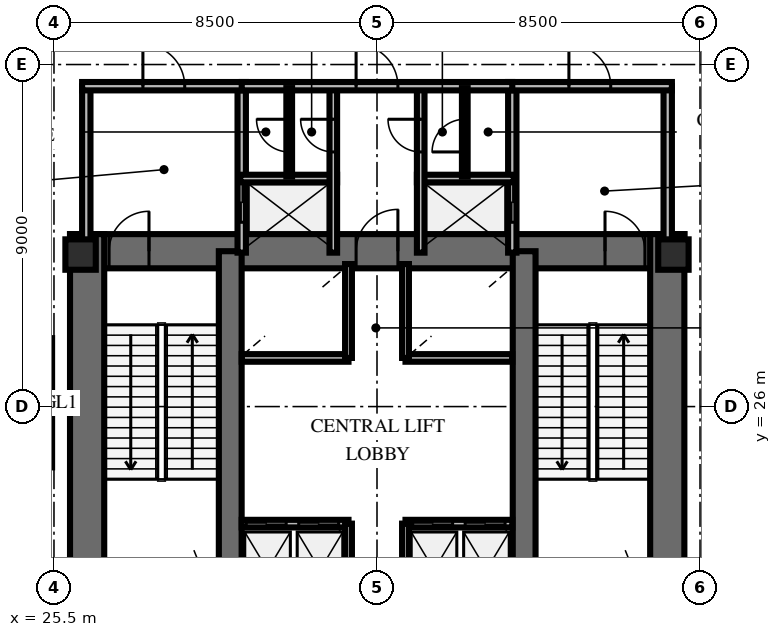
"""IFC4 building model, lengths in metres.
Left out: names, types, materials, properties, quantities, classifications, styles, units other than length and angle.
Written with IfcOpenShell. Run it as: python <this file> out.ifc"""

import sys

from ifc_helpers import new_model, si_unit, direction, frame, frame_2d, origin, origin_2d, place, context, subcontext, project, spatial, rectangle, extrude, element, fill, save


model = new_model("IFC4")
c1 = context("Model", 3, precision=1e-05, world=origin(), true_north=direction((0.0, 1.0)))
c2 = subcontext(c1, "Body", "Model", "MODEL_VIEW")
j1 = project(units=[si_unit("LENGTHUNIT", "METRE"), si_unit("PLANEANGLEUNIT", "RADIAN")], contexts=[c1])
p1 = place(None, origin())
s1 = spatial("IfcSite", under=j1, at=p1, CompositionType="ELEMENT")
p2 = place(p1, origin())
s2 = spatial("IfcBuilding", under=s1, at=p2, CompositionType="ELEMENT")
p3 = place(p2, frame((0.0, 0.0, 10.2)))
s3 = spatial("IfcBuildingStorey", under=s2, at=p3, CompositionType="ELEMENT", Elevation=10.2)
p4 = place(p3, frame((25.922, 30.088, 0.0), z_axis=(0.0, 0.0, 1.0), x_axis=(1.0, 0.0, 0.0)))
e1 = element("IfcWall", 1, at=p4, inside=s3, PredefinedType="SHEAR", context=c2, shape_type="SweptSolid", body=[
    extrude(rectangle(XDim=16.166, YDim=0.9, at=frame_2d((8.083, 0.0))), origin(), (0.0, 0.0, 1.0), 5.4),
])
p5 = place(p4, frame((1.028, 0.0, 0.0)))
e2 = element("IfcOpeningElement", 2, at=p5, cuts=e1, PredefinedType="OPENING", context=c2, shape_type="SweptSolid", body=[
    extrude(rectangle(XDim=1.05, YDim=2.15, at=frame_2d((0.525, 1.075))), frame((0.0, 0.46, 0.0), z_axis=(0.0, -1.0, 0.0), x_axis=(1.0, 0.0, 0.0)), (0.0, 0.0, 1.0), 0.92),
])
p6 = place(p4, frame((14.078, 0.0, 0.0)))
e3 = element("IfcOpeningElement", 3, at=p6, cuts=e1, PredefinedType="OPENING", context=c2, shape_type="SweptSolid", body=[
    extrude(rectangle(XDim=1.05, YDim=2.15, at=frame_2d((0.525, 1.075))), frame((0.0, 0.46, 0.0), z_axis=(0.0, -1.0, 0.0), x_axis=(1.0, 0.0, 0.0)), (0.0, 0.0, 1.0), 0.92),
])
p7 = place(p4, frame((7.528, 0.0, 0.0)))
e4 = element("IfcOpeningElement", 4, at=p7, cuts=e1, PredefinedType="OPENING", context=c2, shape_type="SweptSolid", body=[
    extrude(rectangle(XDim=1.1, YDim=2.15, at=frame_2d((0.55, 1.075))), frame((0.0, 0.46, 0.0), z_axis=(0.0, -1.0, 0.0), x_axis=(1.0, 0.0, 0.0)), (0.0, 0.0, 1.0), 0.92),
])
for number, where, z_axis, x_axis in (
    (5, (26.372, 19.662, 0.0), (0.0, 0.0, 1.0), (0.0, 1.0, 0.0)),
    (6, (41.638, 19.662, 0.0), (0.0, 0.0, 1.0), (0.0, 1.0, 0.0)),
):
    element("IfcWall", number, at=place(p3, frame(where, z_axis=z_axis, x_axis=x_axis)), inside=s3, PredefinedType="SHEAR", context=c2, shape_type="SweptSolid", body=[
        extrude(rectangle(XDim=10.876, YDim=0.9, at=frame_2d((5.438, 0.0))), origin(), (0.0, 0.0, 1.0), 5.4),
    ])
for number, where, z_axis, x_axis in (
    (7, (30.138, 20.112, 0.0), (0.0, 0.0, 1.0), (0.0, 1.0, 0.0)),
    (8, (37.872, 20.112, 0.0), (0.0, 0.0, 1.0), (0.0, 1.0, 0.0)),
):
    element("IfcWall", number, at=place(p3, frame(where, z_axis=z_axis, x_axis=x_axis)), inside=s3, PredefinedType="SHEAR", context=c2, shape_type="SweptSolid", body=[
        extrude(rectangle(XDim=9.976, YDim=0.6, at=frame_2d((4.988, 0.0))), origin(), (0.0, 0.0, 1.0), 5.4),
    ])
for number, where, z_axis, x_axis in (
    (9, (26.2, 30.0, 0.0), (0.0, 0.0, 1.0), (1.0, 0.0, 0.0)),
    (10, (41.8, 30.0, 0.0), (0.0, 0.0, 1.0), (1.0, 0.0, 0.0)),
):
    element("IfcColumn", number, at=place(p3, frame(where, z_axis=z_axis, x_axis=x_axis)), inside=s3, PredefinedType="PILASTER", context=c2, shape_type="SweptSolid", body=[
        extrude(rectangle(XDim=0.8, YDim=0.8, at=origin_2d()), origin(), (0.0, 0.0, 1.0), 5.4),
    ])
p8 = place(p3, frame((26.35, 30.05, 0.0), z_axis=(0.0, 0.0, 1.0), x_axis=(0.0, 1.0, 0.0)))
e11 = element("IfcWall", 11, at=p8, inside=s3, PredefinedType="SOLIDWALL", context=c2, shape_type="SweptSolid", body=[
    extrude(rectangle(XDim=4.38, YDim=0.22, at=frame_2d((2.19, 0.0))), origin(), (0.0, 0.0, 1.0), 3.21),
])
p9 = place(p3, frame((30.44, 30.05, 0.0), z_axis=(0.0, 0.0, 1.0), x_axis=(0.0, 1.0, 0.0)))
e12 = element("IfcWall", 12, at=p9, inside=s3, PredefinedType="SOLIDWALL", context=c2, shape_type="SweptSolid", body=[
    extrude(rectangle(XDim=4.38, YDim=0.22, at=frame_2d((2.19, 0.0))), origin(), (0.0, 0.0, 1.0), 3.21),
])
p10 = place(p9, frame((0.8, 0.0, 0.0)))
e13 = element("IfcOpeningElement", 13, at=p10, cuts=e12, PredefinedType="OPENING", context=c2, shape_type="SweptSolid", body=[
    extrude(rectangle(XDim=1.05, YDim=2.1, at=frame_2d((0.525, 1.05))), frame((0.0, 0.12, 0.0), z_axis=(0.0, -1.0, 0.0), x_axis=(1.0, 0.0, 0.0)), (0.0, 0.0, 1.0), 0.24),
])
p11 = place(p3, frame((26.24, 34.43, 0.0), z_axis=(0.0, 0.0, 1.0), x_axis=(1.0, 0.0, 0.0)))
e14 = element("IfcWall", 14, at=p11, inside=s3, PredefinedType="SOLIDWALL", context=c2, shape_type="SweptSolid", body=[
    extrude(rectangle(XDim=4.31, YDim=0.22, at=frame_2d((2.155, 0.0))), origin(), (0.0, 0.0, 1.0), 3.21),
])
p12 = place(p11, frame((1.6, 0.0, 0.0)))
e15 = element("IfcOpeningElement", 15, at=p12, cuts=e14, PredefinedType="OPENING", context=c2, shape_type="SweptSolid", body=[
    extrude(rectangle(XDim=1.1, YDim=2.15, at=frame_2d((0.55, 1.075))), frame((0.0, 0.12, 0.0), z_axis=(0.0, -1.0, 0.0), x_axis=(1.0, 0.0, 0.0)), (0.0, 0.0, 1.0), 0.24),
])
p13 = place(p3, frame((30.4, 32.0, 0.0), z_axis=(0.0, 0.0, 1.0), x_axis=(1.0, 0.0, 0.0)))
e16 = element("IfcWall", 16, at=p13, inside=s3, PredefinedType="SOLIDWALL", context=c2, shape_type="SweptSolid", body=[
    extrude(rectangle(XDim=2.55, YDim=0.2, at=frame_2d((1.275, 0.0))), origin(), (0.0, 0.0, 1.0), 3.21),
])
p14 = place(p3, frame((32.85, 30.05, 0.0), z_axis=(0.0, 0.0, 1.0), x_axis=(0.0, 1.0, 0.0)))
e17 = element("IfcWall", 17, at=p14, inside=s3, PredefinedType="SOLIDWALL", context=c2, shape_type="SweptSolid", body=[
    extrude(rectangle(XDim=4.38, YDim=0.2, at=frame_2d((2.19, 0.0))), origin(), (0.0, 0.0, 1.0), 3.21),
])
p15 = place(p14, frame((2.65, 0.0, 0.0)))
e18 = element("IfcOpeningElement", 18, at=p15, cuts=e17, PredefinedType="OPENING", context=c2, shape_type="SweptSolid", body=[
    extrude(rectangle(XDim=0.86, YDim=2.05, at=frame_2d((0.43, 1.025))), frame((0.0, 0.11, 0.0), z_axis=(0.0, -1.0, 0.0), x_axis=(1.0, 0.0, 0.0)), (0.0, 0.0, 1.0), 0.22),
])
p16 = place(p3, frame((37.56, 30.05, 0.0), z_axis=(0.0, 0.0, 1.0), x_axis=(0.0, 1.0, 0.0)))
e19 = element("IfcWall", 19, at=p16, inside=s3, PredefinedType="SOLIDWALL", context=c2, shape_type="SweptSolid", body=[
    extrude(rectangle(XDim=4.38, YDim=0.22, at=frame_2d((2.19, 0.0))), origin(), (0.0, 0.0, 1.0), 3.21),
])
p17 = place(p16, frame((0.8, 0.0, 0.0)))
e20 = element("IfcOpeningElement", 20, at=p17, cuts=e19, PredefinedType="OPENING", context=c2, shape_type="SweptSolid", body=[
    extrude(rectangle(XDim=1.05, YDim=2.1, at=frame_2d((0.525, 1.05))), frame((0.0, 0.12, 0.0), z_axis=(0.0, -1.0, 0.0), x_axis=(1.0, 0.0, 0.0)), (0.0, 0.0, 1.0), 0.24),
])
p18 = place(p3, frame((41.65, 30.05, 0.0), z_axis=(0.0, 0.0, 1.0), x_axis=(0.0, 1.0, 0.0)))
e21 = element("IfcWall", 21, at=p18, inside=s3, PredefinedType="SOLIDWALL", context=c2, shape_type="SweptSolid", body=[
    extrude(rectangle(XDim=4.38, YDim=0.22, at=frame_2d((2.19, 0.0))), origin(), (0.0, 0.0, 1.0), 3.21),
])
p19 = place(p3, frame((37.45, 34.43, 0.0), z_axis=(0.0, 0.0, 1.0), x_axis=(1.0, 0.0, 0.0)))
e22 = element("IfcWall", 22, at=p19, inside=s3, PredefinedType="SOLIDWALL", context=c2, shape_type="SweptSolid", body=[
    extrude(rectangle(XDim=4.31, YDim=0.22, at=frame_2d((2.155, 0.0))), origin(), (0.0, 0.0, 1.0), 3.21),
])
p20 = place(p19, frame((1.6, 0.0, 0.0)))
e23 = element("IfcOpeningElement", 23, at=p20, cuts=e22, PredefinedType="OPENING", context=c2, shape_type="SweptSolid", body=[
    extrude(rectangle(XDim=1.1, YDim=2.15, at=frame_2d((0.55, 1.075))), frame((0.0, 0.12, 0.0), z_axis=(0.0, -1.0, 0.0), x_axis=(1.0, 0.0, 0.0)), (0.0, 0.0, 1.0), 0.24),
])
p21 = place(p3, frame((35.05, 32.0, 0.0), z_axis=(0.0, 0.0, 1.0), x_axis=(1.0, 0.0, 0.0)))
e24 = element("IfcWall", 24, at=p21, inside=s3, PredefinedType="SOLIDWALL", context=c2, shape_type="SweptSolid", body=[
    extrude(rectangle(XDim=2.55, YDim=0.2, at=frame_2d((1.275, 0.0))), origin(), (0.0, 0.0, 1.0), 3.21),
])
p22 = place(p3, frame((35.15, 30.05, 0.0), z_axis=(0.0, 0.0, 1.0), x_axis=(0.0, 1.0, 0.0)))
e25 = element("IfcWall", 25, at=p22, inside=s3, PredefinedType="SOLIDWALL", context=c2, shape_type="SweptSolid", body=[
    extrude(rectangle(XDim=4.38, YDim=0.2, at=frame_2d((2.19, 0.0))), origin(), (0.0, 0.0, 1.0), 3.21),
])
p23 = place(p22, frame((2.65, 0.0, 0.0)))
e26 = element("IfcOpeningElement", 26, at=p23, cuts=e25, PredefinedType="OPENING", context=c2, shape_type="SweptSolid", body=[
    extrude(rectangle(XDim=0.86, YDim=2.05, at=frame_2d((0.43, 1.025))), frame((0.0, 0.11, 0.0), z_axis=(0.0, -1.0, 0.0), x_axis=(1.0, 0.0, 0.0)), (0.0, 0.0, 1.0), 0.22),
])
p24 = place(p3, frame((30.44, 34.43, 0.0), z_axis=(0.0, 0.0, 1.0), x_axis=(1.0, 0.0, 0.0)))
e27 = element("IfcWall", 27, at=p24, inside=s3, PredefinedType="SOLIDWALL", context=c2, shape_type="SweptSolid", body=[
    extrude(rectangle(XDim=7.12, YDim=0.22, at=frame_2d((3.56, 0.0))), origin(), (0.0, 0.0, 1.0), 3.21),
])
p25 = place(p24, frame((3.01, 0.0, 0.0)))
e28 = element("IfcOpeningElement", 28, at=p25, cuts=e27, PredefinedType="OPENING", context=c2, shape_type="SweptSolid", body=[
    extrude(rectangle(XDim=1.1, YDim=2.15, at=frame_2d((0.55, 1.075))), frame((0.0, 0.12, 0.0), z_axis=(0.0, -1.0, 0.0), x_axis=(1.0, 0.0, 0.0)), (0.0, 0.0, 1.0), 0.24),
])
p26 = place(p3, frame((31.69, 32.05, 0.0), z_axis=(0.0, 0.0, 1.0), x_axis=(0.0, 1.0, 0.0)))
e29 = element("IfcWall", 29, at=p26, inside=s3, PredefinedType="PARTITIONING", context=c2, shape_type="SweptSolid", body=[
    extrude(rectangle(XDim=2.33, YDim=0.15, at=frame_2d((1.165, 0.0))), origin(), (0.0, 0.0, 1.0), 3.21),
])
p27 = place(p26, frame((0.65, 0.0, 0.0)))
e30 = element("IfcOpeningElement", 30, at=p27, cuts=e29, PredefinedType="OPENING", context=c2, shape_type="SweptSolid", body=[
    extrude(rectangle(XDim=0.86, YDim=2.05, at=frame_2d((0.43, 1.025))), frame((0.0, 0.085, 0.0), z_axis=(0.0, -1.0, 0.0), x_axis=(1.0, 0.0, 0.0)), (0.0, 0.0, 1.0), 0.17),
])
p28 = place(p3, frame((36.31, 32.05, 0.0), z_axis=(0.0, 0.0, 1.0), x_axis=(0.0, 1.0, 0.0)))
e31 = element("IfcWall", 31, at=p28, inside=s3, PredefinedType="PARTITIONING", context=c2, shape_type="SweptSolid", body=[
    extrude(rectangle(XDim=2.33, YDim=0.15, at=frame_2d((1.165, 0.0))), origin(), (0.0, 0.0, 1.0), 3.21),
])
p29 = place(p28, frame((0.65, 0.0, 0.0)))
e32 = element("IfcOpeningElement", 32, at=p29, cuts=e31, PredefinedType="OPENING", context=c2, shape_type="SweptSolid", body=[
    extrude(rectangle(XDim=0.86, YDim=2.05, at=frame_2d((0.43, 1.025))), frame((0.0, 0.085, 0.0), z_axis=(0.0, -1.0, 0.0), x_axis=(1.0, 0.0, 0.0)), (0.0, 0.0, 1.0), 0.17),
])
p30 = place(p3, frame((30.44, 22.92, 0.0), z_axis=(0.0, 0.0, 1.0), x_axis=(1.0, 0.0, 0.0)))
e33 = element("IfcWall", 33, at=p30, inside=s3, PredefinedType="SOLIDWALL", context=c2, shape_type="SweptSolid", body=[
    extrude(rectangle(XDim=2.81, YDim=0.2, at=frame_2d((1.405, 0.0))), origin(), (0.0, 0.0, 1.0), 3.21),
])
p31 = place(p30, frame((0.12, 0.0, 0.0)))
e34 = element("IfcOpeningElement", 34, at=p31, cuts=e33, PredefinedType="OPENING", context=c2, shape_type="SweptSolid", body=[
    extrude(rectangle(XDim=1.05, YDim=2.1, at=frame_2d((0.525, 1.05))), frame((0.0, 0.11, 0.0), z_axis=(0.0, -1.0, 0.0), x_axis=(1.0, 0.0, 0.0)), (0.0, 0.0, 1.0), 0.22),
])
p32 = place(p30, frame((1.5, 0.0, 0.0)))
e35 = element("IfcOpeningElement", 35, at=p32, cuts=e33, PredefinedType="OPENING", context=c2, shape_type="SweptSolid", body=[
    extrude(rectangle(XDim=1.05, YDim=2.1, at=frame_2d((0.525, 1.05))), frame((0.0, 0.11, 0.0), z_axis=(0.0, -1.0, 0.0), x_axis=(1.0, 0.0, 0.0)), (0.0, 0.0, 1.0), 0.22),
])
p33 = place(p3, frame((33.25, 20.5, 0.0), z_axis=(0.0, 0.0, 1.0), x_axis=(0.0, 1.0, 0.0)))
e36 = element("IfcWall", 36, at=p33, inside=s3, PredefinedType="SOLIDWALL", context=c2, shape_type="SweptSolid", body=[
    extrude(rectangle(XDim=2.42, YDim=0.18, at=frame_2d((1.21, 0.0))), origin(), (0.0, 0.0, 1.0), 3.21),
])
p34 = place(p3, frame((34.75, 22.92, 0.0), z_axis=(0.0, 0.0, 1.0), x_axis=(1.0, 0.0, 0.0)))
e37 = element("IfcWall", 37, at=p34, inside=s3, PredefinedType="SOLIDWALL", context=c2, shape_type="SweptSolid", body=[
    extrude(rectangle(XDim=2.81, YDim=0.2, at=frame_2d((1.405, 0.0))), origin(), (0.0, 0.0, 1.0), 3.21),
])
p35 = place(p34, frame((0.19, 0.0, 0.0)))
e38 = element("IfcOpeningElement", 38, at=p35, cuts=e37, PredefinedType="OPENING", context=c2, shape_type="SweptSolid", body=[
    extrude(rectangle(XDim=1.05, YDim=2.1, at=frame_2d((0.525, 1.05))), frame((0.0, 0.11, 0.0), z_axis=(0.0, -1.0, 0.0), x_axis=(1.0, 0.0, 0.0)), (0.0, 0.0, 1.0), 0.22),
])
p36 = place(p34, frame((1.57, 0.0, 0.0)))
e39 = element("IfcOpeningElement", 39, at=p36, cuts=e37, PredefinedType="OPENING", context=c2, shape_type="SweptSolid", body=[
    extrude(rectangle(XDim=1.05, YDim=2.1, at=frame_2d((0.525, 1.05))), frame((0.0, 0.11, 0.0), z_axis=(0.0, -1.0, 0.0), x_axis=(1.0, 0.0, 0.0)), (0.0, 0.0, 1.0), 0.22),
])
p37 = place(p3, frame((34.75, 20.5, 0.0), z_axis=(0.0, 0.0, 1.0), x_axis=(0.0, 1.0, 0.0)))
e40 = element("IfcWall", 40, at=p37, inside=s3, PredefinedType="SOLIDWALL", context=c2, shape_type="SweptSolid", body=[
    extrude(rectangle(XDim=2.42, YDim=0.18, at=frame_2d((1.21, 0.0))), origin(), (0.0, 0.0, 1.0), 3.21),
])
p38 = place(p3, frame((30.44, 27.28, 0.0), z_axis=(0.0, 0.0, 1.0), x_axis=(1.0, 0.0, 0.0)))
e41 = element("IfcWall", 41, at=p38, inside=s3, PredefinedType="SOLIDWALL", context=c2, shape_type="SweptSolid", body=[
    extrude(rectangle(XDim=2.81, YDim=0.2, at=frame_2d((1.405, 0.0))), origin(), (0.0, 0.0, 1.0), 3.21),
])
p39 = place(p3, frame((33.25, 27.28, 0.0), z_axis=(0.0, 0.0, 1.0), x_axis=(0.0, 1.0, 0.0)))
e42 = element("IfcWall", 42, at=p39, inside=s3, PredefinedType="SOLIDWALL", context=c2, shape_type="SweptSolid", body=[
    extrude(rectangle(XDim=2.47, YDim=0.18, at=frame_2d((1.235, 0.0))), origin(), (0.0, 0.0, 1.0), 3.21),
])
p40 = place(p3, frame((34.75, 27.28, 0.0), z_axis=(0.0, 0.0, 1.0), x_axis=(1.0, 0.0, 0.0)))
e43 = element("IfcWall", 43, at=p40, inside=s3, PredefinedType="SOLIDWALL", context=c2, shape_type="SweptSolid", body=[
    extrude(rectangle(XDim=2.81, YDim=0.2, at=frame_2d((1.405, 0.0))), origin(), (0.0, 0.0, 1.0), 3.21),
])
p41 = place(p3, frame((34.75, 27.28, 0.0), z_axis=(0.0, 0.0, 1.0), x_axis=(0.0, 1.0, 0.0)))
e44 = element("IfcWall", 44, at=p41, inside=s3, PredefinedType="SOLIDWALL", context=c2, shape_type="SweptSolid", body=[
    extrude(rectangle(XDim=2.47, YDim=0.18, at=frame_2d((1.235, 0.0))), origin(), (0.0, 0.0, 1.0), 3.21),
])
p42 = place(p5, origin())
e45 = element("IfcDoor", 45, at=p42, inside=s3, OperationType="SINGLE_SWING_RIGHT", PredefinedType="DOOR", context=c2, shape_type="SweptSolid", body=[
    extrude(rectangle(XDim=1.05, YDim=2.15, at=frame_2d((0.525, 1.075))), frame((0.0, 0.025, 0.0), z_axis=(0.0, -1.0, 0.0), x_axis=(1.0, 0.0, 0.0)), (0.0, 0.0, 1.0), 0.05),
])
fill(e2, e45)
p43 = place(p6, origin())
e46 = element("IfcDoor", 46, at=p43, inside=s3, OperationType="SINGLE_SWING_LEFT", PredefinedType="DOOR", context=c2, shape_type="SweptSolid", body=[
    extrude(rectangle(XDim=1.05, YDim=2.15, at=frame_2d((0.525, 1.075))), frame((0.0, 0.025, 0.0), z_axis=(0.0, -1.0, 0.0), x_axis=(1.0, 0.0, 0.0)), (0.0, 0.0, 1.0), 0.05),
])
fill(e3, e46)
p44 = place(p7, origin())
e47 = element("IfcDoor", 47, at=p44, inside=s3, OperationType="SINGLE_SWING_RIGHT", PredefinedType="DOOR", context=c2, shape_type="SweptSolid", body=[
    extrude(rectangle(XDim=1.1, YDim=2.15, at=frame_2d((0.55, 1.075))), frame((0.0, 0.025, 0.0), z_axis=(0.0, -1.0, 0.0), x_axis=(1.0, 0.0, 0.0)), (0.0, 0.0, 1.0), 0.05),
])
fill(e4, e47)
p45 = place(p12, origin())
e48 = element("IfcDoor", 48, at=p45, inside=s3, OperationType="SINGLE_SWING_LEFT", PredefinedType="DOOR", context=c2, shape_type="SweptSolid", body=[
    extrude(rectangle(XDim=1.1, YDim=2.15, at=frame_2d((0.55, 1.075))), frame((0.0, 0.025, 0.0), z_axis=(0.0, -1.0, 0.0), x_axis=(1.0, 0.0, 0.0)), (0.0, 0.0, 1.0), 0.05),
])
fill(e15, e48)
p46 = place(p10, origin())
e49 = element("IfcDoor", 49, at=p46, inside=s3, OperationType="DOUBLE_DOOR_SLIDING", PredefinedType="USERDEFINED", context=c2, shape_type="SweptSolid", body=[
    extrude(rectangle(XDim=1.05, YDim=2.1, at=frame_2d((0.525, 1.05))), frame((0.0, 0.025, 0.0), z_axis=(0.0, -1.0, 0.0), x_axis=(1.0, 0.0, 0.0)), (0.0, 0.0, 1.0), 0.05),
])
fill(e13, e49)
p47 = place(p15, origin())
e50 = element("IfcDoor", 50, at=p47, inside=s3, OperationType="SINGLE_SWING_RIGHT", PredefinedType="TRAPDOOR", context=c2, shape_type="SweptSolid", body=[
    extrude(rectangle(XDim=0.86, YDim=2.05, at=frame_2d((0.43, 1.025))), frame((0.0, 0.025, 0.0), z_axis=(0.0, -1.0, 0.0), x_axis=(1.0, 0.0, 0.0)), (0.0, 0.0, 1.0), 0.05),
])
fill(e18, e50)
p48 = place(p20, origin())
e51 = element("IfcDoor", 51, at=p48, inside=s3, OperationType="SINGLE_SWING_LEFT", PredefinedType="DOOR", context=c2, shape_type="SweptSolid", body=[
    extrude(rectangle(XDim=1.1, YDim=2.15, at=frame_2d((0.55, 1.075))), frame((0.0, 0.025, 0.0), z_axis=(0.0, -1.0, 0.0), x_axis=(1.0, 0.0, 0.0)), (0.0, 0.0, 1.0), 0.05),
])
fill(e23, e51)
p49 = place(p17, origin())
e52 = element("IfcDoor", 52, at=p49, inside=s3, OperationType="DOUBLE_DOOR_SLIDING", PredefinedType="USERDEFINED", context=c2, shape_type="SweptSolid", body=[
    extrude(rectangle(XDim=1.05, YDim=2.1, at=frame_2d((0.525, 1.05))), frame((0.0, 0.025, 0.0), z_axis=(0.0, -1.0, 0.0), x_axis=(1.0, 0.0, 0.0)), (0.0, 0.0, 1.0), 0.05),
])
fill(e20, e52)
p50 = place(p23, origin())
e53 = element("IfcDoor", 53, at=p50, inside=s3, OperationType="SINGLE_SWING_RIGHT", PredefinedType="TRAPDOOR", context=c2, shape_type="SweptSolid", body=[
    extrude(rectangle(XDim=0.86, YDim=2.05, at=frame_2d((0.43, 1.025))), frame((0.0, 0.025, 0.0), z_axis=(0.0, -1.0, 0.0), x_axis=(1.0, 0.0, 0.0)), (0.0, 0.0, 1.0), 0.05),
])
fill(e26, e53)
p51 = place(p25, origin())
e54 = element("IfcDoor", 54, at=p51, inside=s3, OperationType="SINGLE_SWING_LEFT", PredefinedType="DOOR", context=c2, shape_type="SweptSolid", body=[
    extrude(rectangle(XDim=1.1, YDim=2.15, at=frame_2d((0.55, 1.075))), frame((0.0, 0.025, 0.0), z_axis=(0.0, -1.0, 0.0), x_axis=(1.0, 0.0, 0.0)), (0.0, 0.0, 1.0), 0.05),
])
fill(e28, e54)
p52 = place(p27, origin())
e55 = element("IfcDoor", 55, at=p52, inside=s3, OperationType="SINGLE_SWING_RIGHT", PredefinedType="TRAPDOOR", context=c2, shape_type="SweptSolid", body=[
    extrude(rectangle(XDim=0.86, YDim=2.05, at=frame_2d((0.43, 1.025))), frame((0.0, 0.025, 0.0), z_axis=(0.0, -1.0, 0.0), x_axis=(1.0, 0.0, 0.0)), (0.0, 0.0, 1.0), 0.05),
])
fill(e30, e55)
p53 = place(p29, origin())
e56 = element("IfcDoor", 56, at=p53, inside=s3, OperationType="SINGLE_SWING_LEFT", PredefinedType="TRAPDOOR", context=c2, shape_type="SweptSolid", body=[
    extrude(rectangle(XDim=0.86, YDim=2.05, at=frame_2d((0.43, 1.025))), frame((0.0, 0.025, 0.0), z_axis=(0.0, -1.0, 0.0), x_axis=(1.0, 0.0, 0.0)), (0.0, 0.0, 1.0), 0.05),
])
fill(e32, e56)
p54 = place(p31, origin())
e57 = element("IfcDoor", 57, at=p54, inside=s3, OperationType="DOUBLE_DOOR_SLIDING", PredefinedType="USERDEFINED", context=c2, shape_type="SweptSolid", body=[
    extrude(rectangle(XDim=1.05, YDim=2.1, at=frame_2d((0.525, 1.05))), frame((0.0, 0.025, 0.0), z_axis=(0.0, -1.0, 0.0), x_axis=(1.0, 0.0, 0.0)), (0.0, 0.0, 1.0), 0.05),
])
fill(e34, e57)
p55 = place(p32, origin())
e58 = element("IfcDoor", 58, at=p55, inside=s3, OperationType="DOUBLE_DOOR_SLIDING", PredefinedType="USERDEFINED", context=c2, shape_type="SweptSolid", body=[
    extrude(rectangle(XDim=1.05, YDim=2.1, at=frame_2d((0.525, 1.05))), frame((0.0, 0.025, 0.0), z_axis=(0.0, -1.0, 0.0), x_axis=(1.0, 0.0, 0.0)), (0.0, 0.0, 1.0), 0.05),
])
fill(e35, e58)
p56 = place(p35, origin())
e59 = element("IfcDoor", 59, at=p56, inside=s3, OperationType="DOUBLE_DOOR_SLIDING", PredefinedType="USERDEFINED", context=c2, shape_type="SweptSolid", body=[
    extrude(rectangle(XDim=1.05, YDim=2.1, at=frame_2d((0.525, 1.05))), frame((0.0, 0.025, 0.0), z_axis=(0.0, -1.0, 0.0), x_axis=(1.0, 0.0, 0.0)), (0.0, 0.0, 1.0), 0.05),
])
fill(e38, e59)
p57 = place(p36, origin())
e60 = element("IfcDoor", 60, at=p57, inside=s3, OperationType="DOUBLE_DOOR_SLIDING", PredefinedType="USERDEFINED", context=c2, shape_type="SweptSolid", body=[
    extrude(rectangle(XDim=1.05, YDim=2.1, at=frame_2d((0.525, 1.05))), frame((0.0, 0.025, 0.0), z_axis=(0.0, -1.0, 0.0), x_axis=(1.0, 0.0, 0.0)), (0.0, 0.0, 1.0), 0.05),
])
fill(e39, e60)
save(model, sys.argv[1])
